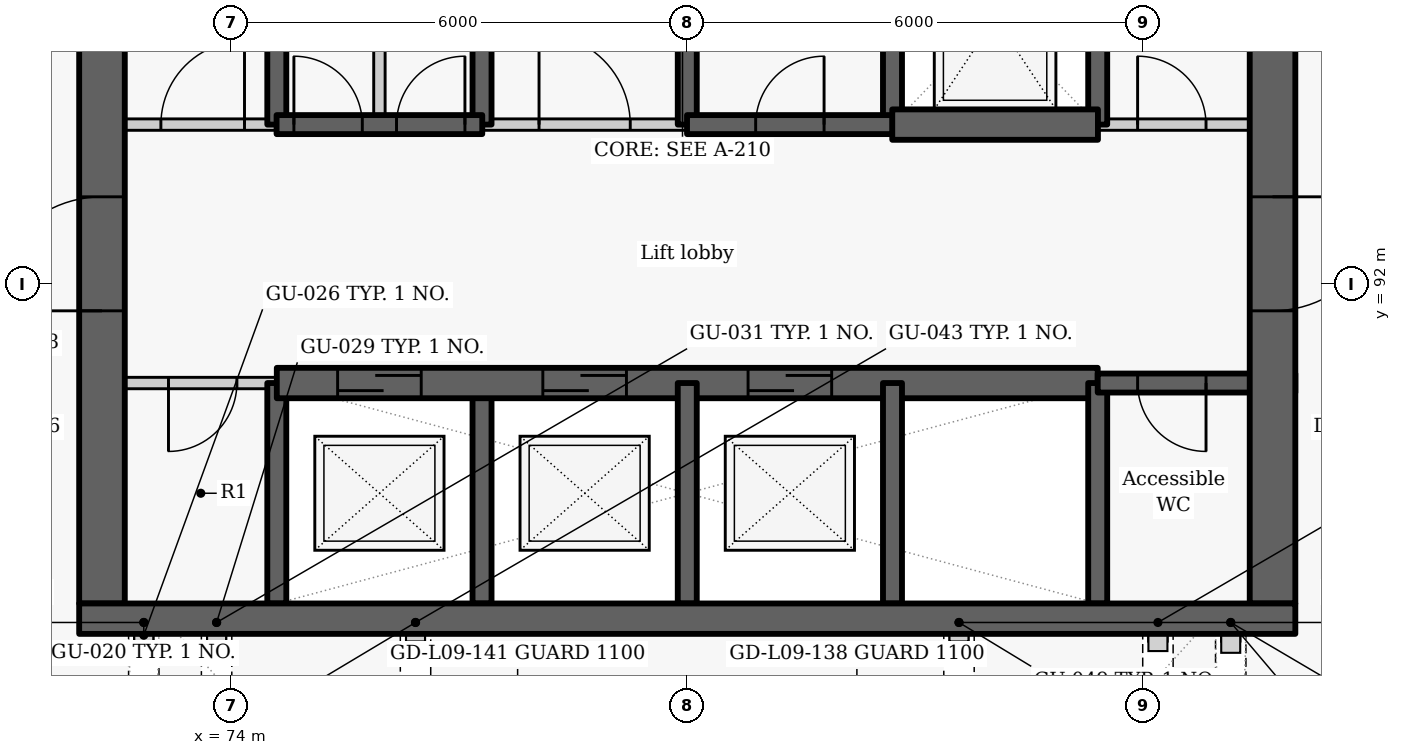
"""IFC4 building model, lengths in metres.
Left out: names, types, materials, properties, quantities, classifications, styles, units other than length and angle.
Written with IfcOpenShell. Run it as: python <this file> out.ifc"""

import sys

from ifc_helpers import new_model, si_unit, direction, frame, frame_2d, origin, place, context, subcontext, project, spatial, rectangle, extrude, element, fill, save


model = new_model("IFC4")
c1 = context("Model", 3, precision=1e-05, world=origin(), true_north=direction((0.0, 1.0)))
c2 = subcontext(c1, "Body", "Model", "MODEL_VIEW")
j1 = project(units=[si_unit("LENGTHUNIT", "METRE"), si_unit("PLANEANGLEUNIT", "RADIAN")], contexts=[c1])
p1 = place(None, origin())
s1 = spatial("IfcSite", under=j1, at=p1, CompositionType="ELEMENT")
p2 = place(p1, origin())
s2 = spatial("IfcBuilding", under=s1, at=p2, CompositionType="ELEMENT")
p3 = place(p2, frame((0.0, 0.0, 38.1)))
s3 = spatial("IfcBuildingStorey", under=s2, at=p3, CompositionType="ELEMENT", Elevation=38.1)
p4 = place(p3, frame((74.6, 87.8, -0.4), z_axis=(0.0, 0.0, 1.0), x_axis=(0.0, 1.0, 0.0)))
e1 = element("IfcWall", 1, at=p4, inside=s3, PredefinedType="SHEAR", context=c2, shape_type="SweptSolid", body=[
    extrude(rectangle(XDim=2.9, YDim=0.25, at=frame_2d((1.45, 0.0))), origin(), (0.0, 0.0, 1.0), 3.425),
])
p5 = place(p3, frame((74.6, 94.1, -0.4), z_axis=(0.0, 0.0, 1.0), x_axis=(0.0, 1.0, 0.0)))
e2 = element("IfcWall", 2, at=p5, inside=s3, PredefinedType="SHEAR", context=c2, shape_type="SweptSolid", body=[
    extrude(rectangle(XDim=2.8, YDim=0.25, at=frame_2d((1.4, 0.0))), origin(), (0.0, 0.0, 1.0), 3.425),
])
p6 = place(p3, frame((74.6, 90.7, 0.0), z_axis=(0.0, 0.0, 1.0), x_axis=(-1.0, 0.0, 0.0)))
e3 = element("IfcWall", 3, at=p6, inside=s3, PredefinedType="PARTITIONING", context=c2, shape_type="SweptSolid", body=[
    extrude(rectangle(XDim=2.6, YDim=0.15, at=frame_2d((1.3, 0.0))), origin(), (0.0, 0.0, 1.0), 3.025),
])
p7 = place(p6, frame((0.525, 0.0, 0.0)))
e4 = element("IfcOpeningElement", 4, at=p7, cuts=e3, PredefinedType="OPENING", context=c2, shape_type="SweptSolid", body=[
    extrude(rectangle(XDim=0.9, YDim=2.1, at=frame_2d((0.45, 1.05))), frame((0.0, 0.085, 0.0), z_axis=(0.0, -1.0, 0.0), x_axis=(1.0, 0.0, 0.0)), (0.0, 0.0, 1.0), 0.17),
])
p8 = place(p3, frame((72.3, 87.8, -0.4), z_axis=(0.0, 0.0, 1.0), x_axis=(0.0, 1.0, 0.0)))
e5 = element("IfcWall", 5, at=p8, inside=s3, PredefinedType="SHEAR", context=c2, shape_type="SweptSolid", body=[
    extrude(rectangle(XDim=9.1, YDim=0.6, at=frame_2d((4.55, 0.0))), origin(), (0.0, 0.0, 1.0), 3.425),
])
p9 = place(p8, frame((3.85, 0.0, 0.4)))
e6 = element("IfcOpeningElement", 6, at=p9, cuts=e5, PredefinedType="OPENING", context=c2, shape_type="SweptSolid", body=[
    extrude(rectangle(XDim=1.5, YDim=2.1, at=frame_2d((0.75, 1.05))), frame((0.0, 0.31, 0.0), z_axis=(0.0, -1.0, 0.0), x_axis=(1.0, 0.0, 0.0)), (0.0, 0.0, 1.0), 0.62),
])
p10 = place(p3, frame((77.3, 87.8, -0.4), z_axis=(0.0, 0.0, 1.0), x_axis=(0.0, 1.0, 0.0)))
e7 = element("IfcWall", 7, at=p10, inside=s3, PredefinedType="SHEAR", context=c2, shape_type="SweptSolid", body=[
    extrude(rectangle(XDim=2.9, YDim=0.25, at=frame_2d((1.45, 0.0))), origin(), (0.0, 0.0, 1.0), 3.425),
])
p11 = place(p3, frame((77.3, 94.1, -0.4), z_axis=(0.0, 0.0, 1.0), x_axis=(0.0, 1.0, 0.0)))
e8 = element("IfcWall", 8, at=p11, inside=s3, PredefinedType="SHEAR", context=c2, shape_type="SweptSolid", body=[
    extrude(rectangle(XDim=2.8, YDim=0.25, at=frame_2d((1.4, 0.0))), origin(), (0.0, 0.0, 1.0), 3.425),
])
p12 = place(p3, frame((74.6, 90.7, -0.4), z_axis=(0.0, 0.0, 1.0), x_axis=(1.0, 0.0, 0.0)))
e9 = element("IfcWall", 9, at=p12, inside=s3, PredefinedType="SHEAR", context=c2, shape_type="SweptSolid", body=[
    extrude(rectangle(XDim=10.8, YDim=0.4, at=frame_2d((5.4, 0.0))), origin(), (0.0, 0.0, 1.0), 3.425),
])
p13 = place(p12, frame((0.8, 0.0, 0.4)))
e10 = element("IfcOpeningElement", 10, at=p13, cuts=e9, PredefinedType="OPENING", context=c2, shape_type="SweptSolid", body=[
    extrude(rectangle(XDim=1.1, YDim=2.1, at=frame_2d((0.55, 1.05))), frame((0.0, 0.21, 0.0), z_axis=(0.0, -1.0, 0.0), x_axis=(1.0, 0.0, 0.0)), (0.0, 0.0, 1.0), 0.42),
])
p14 = place(p12, frame((3.5, 0.0, 0.4)))
e11 = element("IfcOpeningElement", 11, at=p14, cuts=e9, PredefinedType="OPENING", context=c2, shape_type="SweptSolid", body=[
    extrude(rectangle(XDim=1.1, YDim=2.1, at=frame_2d((0.55, 1.05))), frame((0.0, 0.21, 0.0), z_axis=(0.0, -1.0, 0.0), x_axis=(1.0, 0.0, 0.0)), (0.0, 0.0, 1.0), 0.42),
])
p15 = place(p12, frame((6.2, 0.0, 0.4)))
e12 = element("IfcOpeningElement", 12, at=p15, cuts=e9, PredefinedType="OPENING", context=c2, shape_type="SweptSolid", body=[
    extrude(rectangle(XDim=1.1, YDim=2.1, at=frame_2d((0.55, 1.05))), frame((0.0, 0.21, 0.0), z_axis=(0.0, -1.0, 0.0), x_axis=(1.0, 0.0, 0.0)), (0.0, 0.0, 1.0), 0.42),
])
p16 = place(p3, frame((80.0, 87.8, -0.4), z_axis=(0.0, 0.0, 1.0), x_axis=(0.0, 1.0, 0.0)))
e13 = element("IfcWall", 13, at=p16, inside=s3, PredefinedType="SHEAR", context=c2, shape_type="SweptSolid", body=[
    extrude(rectangle(XDim=2.9, YDim=0.25, at=frame_2d((1.45, 0.0))), origin(), (0.0, 0.0, 1.0), 3.425),
])
p17 = place(p3, frame((80.0, 94.1, -0.4), z_axis=(0.0, 0.0, 1.0), x_axis=(0.0, 1.0, 0.0)))
e14 = element("IfcWall", 14, at=p17, inside=s3, PredefinedType="SHEAR", context=c2, shape_type="SweptSolid", body=[
    extrude(rectangle(XDim=2.8, YDim=0.25, at=frame_2d((1.4, 0.0))), origin(), (0.0, 0.0, 1.0), 3.425),
])
p18 = place(p3, frame((82.7, 87.8, -0.4), z_axis=(0.0, 0.0, 1.0), x_axis=(0.0, 1.0, 0.0)))
e15 = element("IfcWall", 15, at=p18, inside=s3, PredefinedType="SHEAR", context=c2, shape_type="SweptSolid", body=[
    extrude(rectangle(XDim=2.9, YDim=0.25, at=frame_2d((1.45, 0.0))), origin(), (0.0, 0.0, 1.0), 3.425),
])
p19 = place(p3, frame((82.7, 94.1, -0.4), z_axis=(0.0, 0.0, 1.0), x_axis=(0.0, 1.0, 0.0)))
e16 = element("IfcWall", 16, at=p19, inside=s3, PredefinedType="SHEAR", context=c2, shape_type="SweptSolid", body=[
    extrude(rectangle(XDim=2.8, YDim=0.25, at=frame_2d((1.4, 0.0))), origin(), (0.0, 0.0, 1.0), 3.425),
])
p20 = place(p3, frame((85.4, 87.8, -0.4), z_axis=(0.0, 0.0, 1.0), x_axis=(0.0, 1.0, 0.0)))
e17 = element("IfcWall", 17, at=p20, inside=s3, PredefinedType="SHEAR", context=c2, shape_type="SweptSolid", body=[
    extrude(rectangle(XDim=2.9, YDim=0.25, at=frame_2d((1.45, 0.0))), origin(), (0.0, 0.0, 1.0), 3.425),
])
p21 = place(p3, frame((85.4, 94.1, -0.4), z_axis=(0.0, 0.0, 1.0), x_axis=(0.0, 1.0, 0.0)))
e18 = element("IfcWall", 18, at=p21, inside=s3, PredefinedType="SHEAR", context=c2, shape_type="SweptSolid", body=[
    extrude(rectangle(XDim=2.8, YDim=0.25, at=frame_2d((1.4, 0.0))), origin(), (0.0, 0.0, 1.0), 3.425),
])
p22 = place(p3, frame((88.0, 90.7, -0.4), z_axis=(0.0, 0.0, 1.0), x_axis=(-1.0, 0.0, 0.0)))
e19 = element("IfcWall", 19, at=p22, inside=s3, PredefinedType="SHEAR", context=c2, shape_type="SweptSolid", body=[
    extrude(rectangle(XDim=2.6, YDim=0.25, at=frame_2d((1.3, 0.0))), origin(), (0.0, 0.0, 1.0), 3.425),
])
p23 = place(p22, frame((1.175, 0.0, 0.4)))
e20 = element("IfcOpeningElement", 20, at=p23, cuts=e19, PredefinedType="OPENING", context=c2, shape_type="SweptSolid", body=[
    extrude(rectangle(XDim=0.9, YDim=2.1, at=frame_2d((0.45, 1.05))), frame((0.0, 0.135, 0.0), z_axis=(0.0, -1.0, 0.0), x_axis=(1.0, 0.0, 0.0)), (0.0, 0.0, 1.0), 0.27),
])
p24 = place(p3, frame((87.7, 103.4, -0.4), z_axis=(0.0, 0.0, 1.0), x_axis=(0.0, -1.0, 0.0)))
e21 = element("IfcWall", 21, at=p24, inside=s3, PredefinedType="SHEAR", context=c2, shape_type="SweptSolid", body=[
    extrude(rectangle(XDim=15.6, YDim=0.6, at=frame_2d((7.8, 0.0))), origin(), (0.0, 0.0, 1.0), 3.425),
])
p25 = place(p24, frame((10.25, 0.0, 0.4)))
e22 = element("IfcOpeningElement", 22, at=p25, cuts=e21, PredefinedType="OPENING", context=c2, shape_type="SweptSolid", body=[
    extrude(rectangle(XDim=1.5, YDim=2.1, at=frame_2d((0.75, 1.05))), frame((0.0, 0.31, 0.0), z_axis=(0.0, -1.0, 0.0), x_axis=(1.0, 0.0, 0.0)), (0.0, 0.0, 1.0), 0.62),
])
p26 = place(p24, frame((2.7, 0.0, 0.4)))
e23 = element("IfcOpeningElement", 23, at=p26, cuts=e21, PredefinedType="OPENING", context=c2, shape_type="SweptSolid", body=[
    extrude(rectangle(XDim=1.1, YDim=2.1, at=frame_2d((0.55, 1.05))), frame((0.0, 0.31, 0.0), z_axis=(0.0, -1.0, 0.0), x_axis=(1.0, 0.0, 0.0)), (0.0, 0.0, 1.0), 0.62),
])
p27 = place(p3, frame((72.0, 94.1, 0.0), z_axis=(0.0, 0.0, 1.0), x_axis=(1.0, 0.0, 0.0)))
e24 = element("IfcWall", 24, at=p27, inside=s3, PredefinedType="PARTITIONING", context=c2, shape_type="SweptSolid", body=[
    extrude(rectangle(XDim=2.603, YDim=0.15, at=frame_2d((1.302, 0.0))), origin(), (0.0, 0.0, 1.0), 3.025),
])
p28 = place(p27, frame((1.075, 0.0, 0.0)))
e25 = element("IfcOpeningElement", 25, at=p28, cuts=e24, PredefinedType="OPENING", context=c2, shape_type="SweptSolid", body=[
    extrude(rectangle(XDim=1.1, YDim=2.1, at=frame_2d((0.55, 1.05))), frame((0.0, 0.085, 0.0), z_axis=(0.0, -1.0, 0.0), x_axis=(1.0, 0.0, 0.0)), (0.0, 0.0, 1.0), 0.17),
])
p29 = place(p3, frame((77.297, 94.1, 0.0), z_axis=(0.0, 0.0, 1.0), x_axis=(1.0, 0.0, 0.0)))
e26 = element("IfcWall", 26, at=p29, inside=s3, PredefinedType="PARTITIONING", context=c2, shape_type="SweptSolid", body=[
    extrude(rectangle(XDim=2.706, YDim=0.15, at=frame_2d((1.353, 0.0))), origin(), (0.0, 0.0, 1.0), 3.025),
])
p30 = place(p29, frame((0.753, 0.0, 0.0)))
e27 = element("IfcOpeningElement", 27, at=p30, cuts=e26, PredefinedType="OPENING", context=c2, shape_type="SweptSolid", body=[
    extrude(rectangle(XDim=1.2, YDim=2.1, at=frame_2d((0.6, 1.05))), frame((0.0, 0.085, 0.0), z_axis=(0.0, -1.0, 0.0), x_axis=(1.0, 0.0, 0.0)), (0.0, 0.0, 1.0), 0.17),
])
p31 = place(p3, frame((85.397, 94.1, 0.0), z_axis=(0.0, 0.0, 1.0), x_axis=(1.0, 0.0, 0.0)))
e28 = element("IfcWall", 28, at=p31, inside=s3, PredefinedType="PARTITIONING", context=c2, shape_type="SweptSolid", body=[
    extrude(rectangle(XDim=2.603, YDim=0.15, at=frame_2d((1.302, 0.0))), origin(), (0.0, 0.0, 1.0), 3.025),
])
p32 = place(p31, frame((0.528, 0.0, 0.0)))
e29 = element("IfcOpeningElement", 29, at=p32, cuts=e28, PredefinedType="OPENING", context=c2, shape_type="SweptSolid", body=[
    extrude(rectangle(XDim=0.9, YDim=2.1, at=frame_2d((0.45, 1.05))), frame((0.0, 0.085, 0.0), z_axis=(0.0, -1.0, 0.0), x_axis=(1.0, 0.0, 0.0)), (0.0, 0.0, 1.0), 0.17),
])
p33 = place(p3, frame((74.597, 94.1, -0.4), z_axis=(0.0, 0.0, 1.0), x_axis=(1.0, 0.0, 0.0)))
e30 = element("IfcWall", 30, at=p33, inside=s3, PredefinedType="SHEAR", context=c2, shape_type="SweptSolid", body=[
    extrude(rectangle(XDim=2.706, YDim=0.25, at=frame_2d((1.353, 0.0))), origin(), (0.0, 0.0, 1.0), 3.425),
])
p34 = place(p33, frame((0.228, 0.0, 0.4)))
e31 = element("IfcOpeningElement", 31, at=p34, cuts=e30, PredefinedType="OPENING", context=c2, shape_type="SweptSolid", body=[
    extrude(rectangle(XDim=0.9, YDim=2.1, at=frame_2d((0.45, 1.05))), frame((0.0, 0.135, 0.0), z_axis=(0.0, -1.0, 0.0), x_axis=(1.0, 0.0, 0.0)), (0.0, 0.0, 1.0), 0.27),
])
p35 = place(p33, frame((1.578, 0.0, 0.4)))
e32 = element("IfcOpeningElement", 32, at=p35, cuts=e30, PredefinedType="OPENING", context=c2, shape_type="SweptSolid", body=[
    extrude(rectangle(XDim=0.9, YDim=2.1, at=frame_2d((0.45, 1.05))), frame((0.0, 0.135, 0.0), z_axis=(0.0, -1.0, 0.0), x_axis=(1.0, 0.0, 0.0)), (0.0, 0.0, 1.0), 0.27),
])
p36 = place(p3, frame((79.997, 94.1, -0.4), z_axis=(0.0, 0.0, 1.0), x_axis=(1.0, 0.0, 0.0)))
e33 = element("IfcWall", 33, at=p36, inside=s3, PredefinedType="SHEAR", context=c2, shape_type="SweptSolid", body=[
    extrude(rectangle(XDim=2.706, YDim=0.25, at=frame_2d((1.353, 0.0))), origin(), (0.0, 0.0, 1.0), 3.425),
])
p37 = place(p36, frame((0.903, 0.0, 0.4)))
e34 = element("IfcOpeningElement", 34, at=p37, cuts=e33, PredefinedType="OPENING", context=c2, shape_type="SweptSolid", body=[
    extrude(rectangle(XDim=0.9, YDim=2.1, at=frame_2d((0.45, 1.05))), frame((0.0, 0.135, 0.0), z_axis=(0.0, -1.0, 0.0), x_axis=(1.0, 0.0, 0.0)), (0.0, 0.0, 1.0), 0.27),
])
p38 = place(p3, frame((82.697, 94.1, -0.4), z_axis=(0.0, 0.0, 1.0), x_axis=(1.0, 0.0, 0.0)))
e35 = element("IfcWall", 35, at=p38, inside=s3, PredefinedType="SHEAR", context=c2, shape_type="SweptSolid", body=[
    extrude(rectangle(XDim=2.706, YDim=0.4, at=frame_2d((1.353, 0.0))), origin(), (0.0, 0.0, 1.0), 3.425),
])
p39 = place(p3, frame((75.95, 94.1, 0.0), z_axis=(0.0, 0.0, 1.0), x_axis=(0.0, 1.0, 0.0)))
e36 = element("IfcWall", 36, at=p39, inside=s3, PredefinedType="PARTITIONING", context=c2, shape_type="SweptSolid", body=[
    extrude(rectangle(XDim=2.8, YDim=0.15, at=frame_2d((1.4, 0.0))), origin(), (0.0, 0.0, 1.0), 3.025),
])
p40 = place(p3, frame((72.0, 87.6, -0.4), z_axis=(0.0, 0.0, 1.0), x_axis=(1.0, 0.0, 0.0)))
e37 = element("IfcWall", 37, at=p40, inside=s3, PredefinedType="SHEAR", context=c2, shape_type="SweptSolid", body=[
    extrude(rectangle(XDim=16.0, YDim=0.4, at=frame_2d((8.0, 0.0))), origin(), (0.0, 0.0, 1.0), 3.425),
])
p41 = place(p7, origin())
e38 = element("IfcDoor", 38, at=p41, inside=s3, OperationType="SINGLE_SWING_RIGHT", PredefinedType="DOOR", context=c2, shape_type="SweptSolid", body=[
    extrude(rectangle(XDim=0.9, YDim=2.1, at=frame_2d((0.45, 1.05))), frame((0.0, 0.025, 0.0), z_axis=(0.0, -1.0, 0.0), x_axis=(1.0, 0.0, 0.0)), (0.0, 0.0, 1.0), 0.05),
])
fill(e4, e38)
p42 = place(p13, origin())
e39 = element("IfcDoor", 39, at=p42, inside=s3, OperationType="SLIDING_TO_LEFT", PredefinedType="DOOR", context=c2, shape_type="SweptSolid", body=[
    extrude(rectangle(XDim=1.1, YDim=2.1, at=frame_2d((0.55, 1.05))), frame((0.0, 0.025, 0.0), z_axis=(0.0, -1.0, 0.0), x_axis=(1.0, 0.0, 0.0)), (0.0, 0.0, 1.0), 0.05),
])
fill(e10, e39)
p43 = place(p14, origin())
e40 = element("IfcDoor", 40, at=p43, inside=s3, OperationType="SLIDING_TO_LEFT", PredefinedType="DOOR", context=c2, shape_type="SweptSolid", body=[
    extrude(rectangle(XDim=1.1, YDim=2.1, at=frame_2d((0.55, 1.05))), frame((0.0, 0.025, 0.0), z_axis=(0.0, -1.0, 0.0), x_axis=(1.0, 0.0, 0.0)), (0.0, 0.0, 1.0), 0.05),
])
fill(e11, e40)
p44 = place(p15, origin())
e41 = element("IfcDoor", 41, at=p44, inside=s3, OperationType="SLIDING_TO_LEFT", PredefinedType="DOOR", context=c2, shape_type="SweptSolid", body=[
    extrude(rectangle(XDim=1.1, YDim=2.1, at=frame_2d((0.55, 1.05))), frame((0.0, 0.025, 0.0), z_axis=(0.0, -1.0, 0.0), x_axis=(1.0, 0.0, 0.0)), (0.0, 0.0, 1.0), 0.05),
])
fill(e12, e41)
p45 = place(p23, origin())
e42 = element("IfcDoor", 42, at=p45, inside=s3, OperationType="SINGLE_SWING_LEFT", PredefinedType="DOOR", context=c2, shape_type="SweptSolid", body=[
    extrude(rectangle(XDim=0.9, YDim=2.1, at=frame_2d((0.45, 1.05))), frame((0.0, 0.025, 0.0), z_axis=(0.0, -1.0, 0.0), x_axis=(1.0, 0.0, 0.0)), (0.0, 0.0, 1.0), 0.05),
])
fill(e20, e42)
p46 = place(p28, origin())
e43 = element("IfcDoor", 43, at=p46, inside=s3, OperationType="SINGLE_SWING_RIGHT", PredefinedType="DOOR", context=c2, shape_type="SweptSolid", body=[
    extrude(rectangle(XDim=1.1, YDim=2.1, at=frame_2d((0.55, 1.05))), frame((0.0, 0.025, 0.0), z_axis=(0.0, -1.0, 0.0), x_axis=(1.0, 0.0, 0.0)), (0.0, 0.0, 1.0), 0.05),
])
fill(e25, e43)
p47 = place(p34, origin())
e44 = element("IfcDoor", 44, at=p47, inside=s3, OperationType="SINGLE_SWING_LEFT", PredefinedType="DOOR", context=c2, shape_type="SweptSolid", body=[
    extrude(rectangle(XDim=0.9, YDim=2.1, at=frame_2d((0.45, 1.05))), frame((0.0, 0.025, 0.0), z_axis=(0.0, -1.0, 0.0), x_axis=(1.0, 0.0, 0.0)), (0.0, 0.0, 1.0), 0.05),
])
fill(e31, e44)
p48 = place(p35, origin())
e45 = element("IfcDoor", 45, at=p48, inside=s3, OperationType="SINGLE_SWING_RIGHT", PredefinedType="DOOR", context=c2, shape_type="SweptSolid", body=[
    extrude(rectangle(XDim=0.9, YDim=2.1, at=frame_2d((0.45, 1.05))), frame((0.0, 0.025, 0.0), z_axis=(0.0, -1.0, 0.0), x_axis=(1.0, 0.0, 0.0)), (0.0, 0.0, 1.0), 0.05),
])
fill(e32, e45)
p49 = place(p30, origin())
e46 = element("IfcDoor", 46, at=p49, inside=s3, OperationType="DOUBLE_DOOR_SINGLE_SWING", PredefinedType="DOOR", context=c2, shape_type="SweptSolid", body=[
    extrude(rectangle(XDim=1.2, YDim=2.1, at=frame_2d((0.6, 1.05))), frame((0.0, 0.025, 0.0), z_axis=(0.0, -1.0, 0.0), x_axis=(1.0, 0.0, 0.0)), (0.0, 0.0, 1.0), 0.05),
])
fill(e27, e46)
p50 = place(p37, origin())
e47 = element("IfcDoor", 47, at=p50, inside=s3, OperationType="SINGLE_SWING_RIGHT", PredefinedType="DOOR", context=c2, shape_type="SweptSolid", body=[
    extrude(rectangle(XDim=0.9, YDim=2.1, at=frame_2d((0.45, 1.05))), frame((0.0, 0.025, 0.0), z_axis=(0.0, -1.0, 0.0), x_axis=(1.0, 0.0, 0.0)), (0.0, 0.0, 1.0), 0.05),
])
fill(e34, e47)
p51 = place(p32, origin())
e48 = element("IfcDoor", 48, at=p51, inside=s3, OperationType="SINGLE_SWING_LEFT", PredefinedType="DOOR", context=c2, shape_type="SweptSolid", body=[
    extrude(rectangle(XDim=0.9, YDim=2.1, at=frame_2d((0.45, 1.05))), frame((0.0, 0.025, 0.0), z_axis=(0.0, -1.0, 0.0), x_axis=(1.0, 0.0, 0.0)), (0.0, 0.0, 1.0), 0.05),
])
fill(e29, e48)
p52 = place(p25, origin())
e49 = element("IfcDoor", 49, at=p52, inside=s3, OperationType="DOUBLE_DOOR_SINGLE_SWING", PredefinedType="DOOR", context=c2, shape_type="SweptSolid", body=[
    extrude(rectangle(XDim=1.5, YDim=2.1, at=frame_2d((0.75, 1.05))), frame((0.0, 0.025, 0.0), z_axis=(0.0, -1.0, 0.0), x_axis=(1.0, 0.0, 0.0)), (0.0, 0.0, 1.0), 0.05),
])
fill(e22, e49)
p53 = place(p9, origin())
e50 = element("IfcDoor", 50, at=p53, inside=s3, OperationType="DOUBLE_DOOR_SINGLE_SWING", PredefinedType="DOOR", context=c2, shape_type="SweptSolid", body=[
    extrude(rectangle(XDim=1.5, YDim=2.1, at=frame_2d((0.75, 1.05))), frame((0.0, 0.025, 0.0), z_axis=(0.0, -1.0, 0.0), x_axis=(1.0, 0.0, 0.0)), (0.0, 0.0, 1.0), 0.05),
])
fill(e6, e50)
save(model, sys.argv[1])
